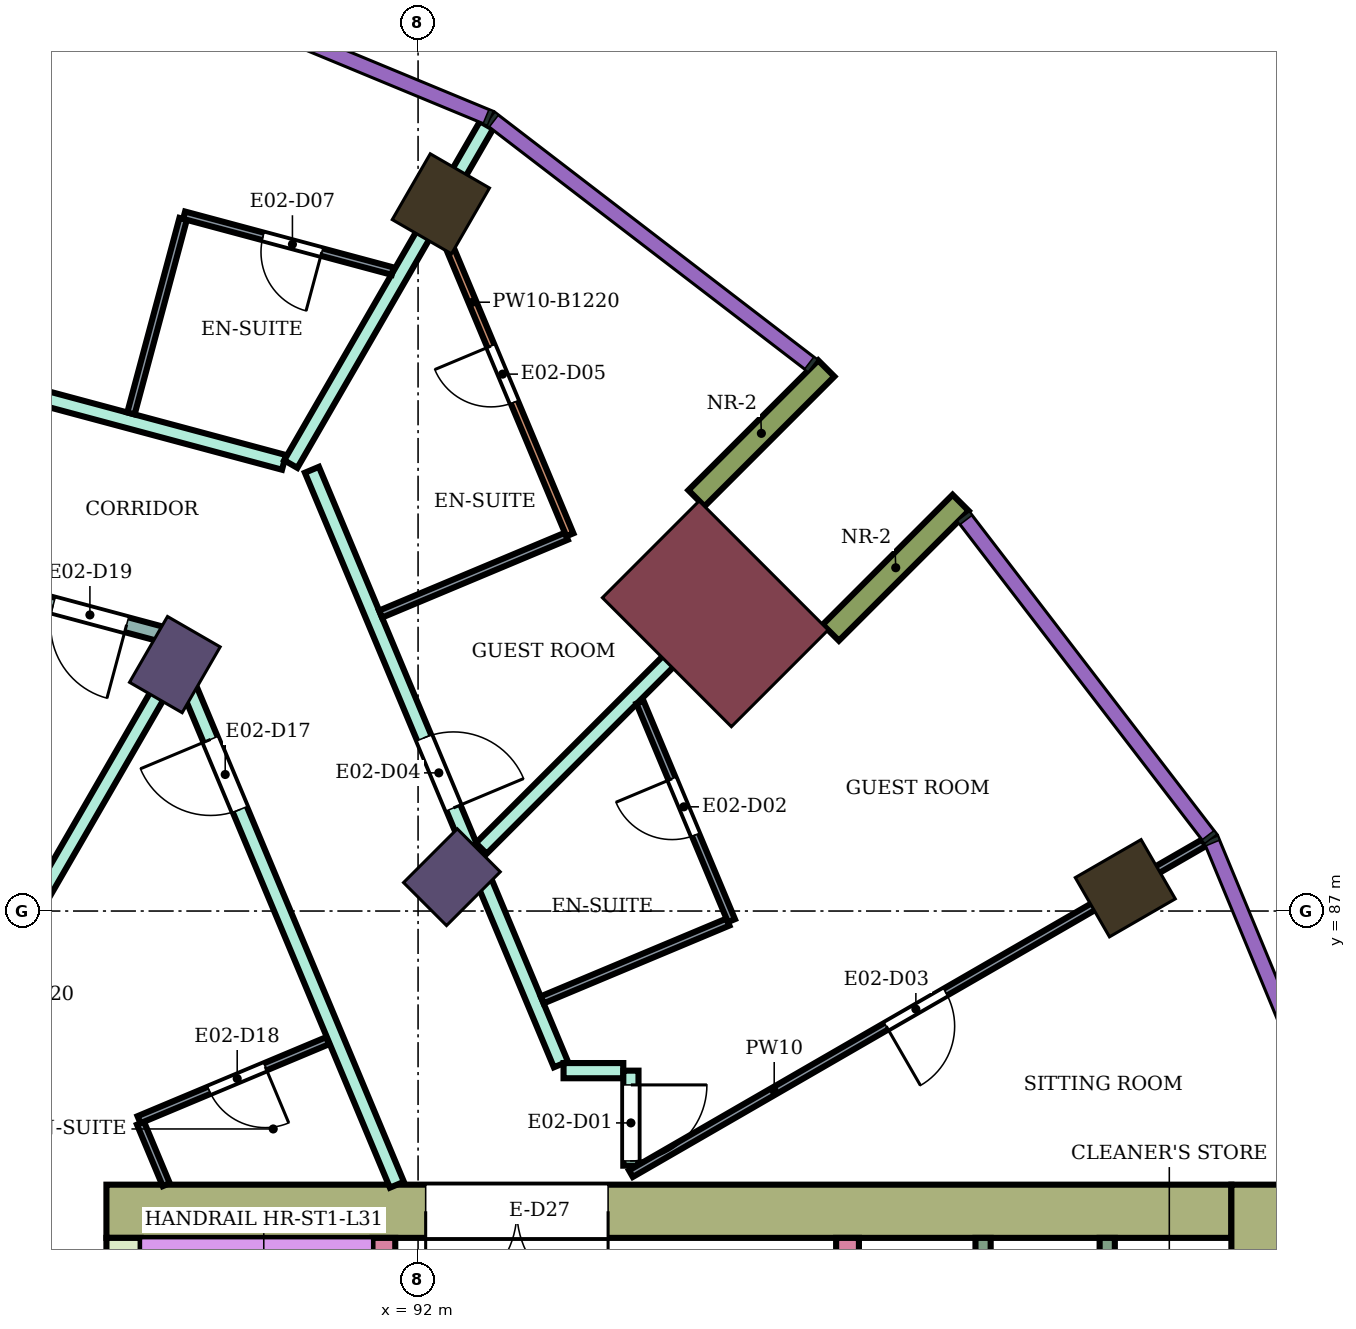
"""IFC4 building model, lengths in metres.
Left out: names, types, materials, properties, quantities, classifications, styles, units other than length and angle.
Written with IfcOpenShell. Run it as: python <this file> out.ifc"""

import sys

from ifc_helpers import new_model, si_unit, direction, frame, frame_2d, origin, origin_2d, place, context, subcontext, project, spatial, rectangle, extrude, element, fill, save


model = new_model("IFC4")
c1 = context("Model", 3, precision=1e-05, world=origin(), true_north=direction((0.0, 1.0)))
c2 = subcontext(c1, "Body", "Model", "MODEL_VIEW")
j1 = project(units=[si_unit("LENGTHUNIT", "METRE"), si_unit("PLANEANGLEUNIT", "RADIAN")], contexts=[c1])
p1 = place(None, origin())
s1 = spatial("IfcSite", under=j1, at=p1, CompositionType="ELEMENT")
p2 = place(p1, origin())
s2 = spatial("IfcBuilding", under=s1, at=p2, CompositionType="ELEMENT")
p3 = place(p2, frame((0.0, 0.0, 134.1)))
s3 = spatial("IfcBuildingStorey", under=s2, at=p3, CompositionType="ELEMENT", Elevation=134.1)
for number, where, z_axis, x_axis in (
    (1, (101.304, 87.3, 0.0), (0.0, 0.0, 1.0), (0.866, 0.5, 0.0)),
    (2, (92.3, 96.304, 0.0), (0.0, 0.0, 1.0), (0.5, 0.866, 0.0)),
):
    element("IfcColumn", number, at=place(p3, frame(where, z_axis=z_axis, x_axis=x_axis)), inside=s3, PredefinedType="COLUMN", context=c2, shape_type="SweptSolid", body=[
        extrude(rectangle(XDim=1.0, YDim=0.9, at=origin_2d()), origin(), (0.0, 0.0, 1.0), 3.9),
    ])
for number, where, z_axis, x_axis in (
    (3, (92.445, 87.445, 0.0), (0.0, 0.0, 1.0), (0.707, 0.707, 0.0)),
    (4, (88.8, 90.242, 0.0), (0.0, 0.0, 1.0), (0.5, 0.866, 0.0)),
):
    element("IfcColumn", number, at=place(p3, frame(where, z_axis=z_axis, x_axis=x_axis)), inside=s3, PredefinedType="COLUMN", context=c2, shape_type="SweptSolid", body=[
        extrude(rectangle(XDim=1.0, YDim=0.8, at=origin_2d()), origin(), (0.0, 0.0, 1.0), 3.9),
    ])
p4 = place(p3, frame((95.91, 90.91, 0.0), z_axis=(0.0, 0.0, 1.0), x_axis=(0.707106781187, 0.707106781187, 0.0)))
e5 = element("IfcColumn", 5, at=p4, inside=s3, PredefinedType="COLUMN", context=c2, shape_type="SweptSolid", body=[
    extrude(rectangle(XDim=1.8, YDim=2.4, at=origin_2d()), origin(), (0.0, 0.0, 1.0), 3.9),
])
p5 = place(p3, frame((87.9, 83.05, 0.0), z_axis=(0.0, 0.0, 1.0), x_axis=(1.0, 0.0, 0.0)))
e6 = element("IfcWall", 6, at=p5, inside=s3, PredefinedType="SHEAR", context=c2, shape_type="SweptSolid", body=[
    extrude(rectangle(XDim=14.8, YDim=0.7, at=frame_2d((7.4, 0.0))), origin(), (0.0, 0.0, 1.0), 3.58),
])
p6 = place(p5, frame((4.2, 0.0, 0.0)))
e7 = element("IfcOpeningElement", 7, at=p6, cuts=e6, PredefinedType="OPENING", context=c2, shape_type="SweptSolid", body=[
    extrude(rectangle(XDim=2.4, YDim=2.4, at=frame_2d((1.2, 1.2))), frame((0.0, 0.36, 0.0), z_axis=(0.0, -1.0, 0.0), x_axis=(1.0, 0.0, 0.0)), (0.0, 0.0, 1.0), 0.72),
])
p7 = place(p3, frame((88.125, 75.0, 0.0), z_axis=(0.0, 0.0, 1.0), x_axis=(0.0, 1.0, 0.0)))
e8 = element("IfcWall", 8, at=p7, inside=s3, PredefinedType="SHEAR", context=c2, shape_type="SweptSolid", body=[
    extrude(rectangle(XDim=7.7, YDim=0.45, at=frame_2d((3.85, 0.0))), origin(), (0.0, 0.0, 1.0), 3.58),
])
p8 = place(p3, frame((103.05, 66.6, 0.0), z_axis=(0.0, 0.0, 1.0), x_axis=(0.0, 1.0, 0.0)))
e9 = element("IfcWall", 9, at=p8, inside=s3, PredefinedType="SHEAR", context=c2, shape_type="SweptSolid", body=[
    extrude(rectangle(XDim=16.8, YDim=0.7, at=frame_2d((8.4, 0.0))), origin(), (0.0, 0.0, 1.0), 3.58),
])
p9 = place(p3, frame((91.55, 75.0, 0.0), z_axis=(0.0, 0.0, 1.0), x_axis=(0.0, 1.0, 0.0)))
e10 = element("IfcWall", 10, at=p9, inside=s3, PredefinedType="SHEAR", context=c2, shape_type="SweptSolid", body=[
    extrude(rectangle(XDim=7.7, YDim=0.3, at=frame_2d((3.85, 0.0))), origin(), (0.0, 0.0, 1.0), 3.58),
])
p10 = place(p9, frame((1.85, 0.0, 0.0)))
e11 = element("IfcOpeningElement", 11, at=p10, cuts=e10, PredefinedType="OPENING", context=c2, shape_type="SweptSolid", body=[
    extrude(rectangle(XDim=0.9, YDim=2.1, at=frame_2d((0.45, 1.05))), frame((0.0, 0.16, 0.0), z_axis=(0.0, -1.0, 0.0), x_axis=(1.0, 0.0, 0.0)), (0.0, 0.0, 1.0), 0.32),
])
p11 = place(p3, frame((97.65, 79.55, 0.0), z_axis=(0.0, 0.0, 1.0), x_axis=(0.0, 1.0, 0.0)))
e12 = element("IfcWall", 12, at=p11, inside=s3, PredefinedType="SHEAR", context=c2, shape_type="SweptSolid", body=[
    extrude(rectangle(XDim=3.15, YDim=0.3, at=frame_2d((1.575, 0.0))), origin(), (0.0, 0.0, 1.0), 3.58),
])
for number, where, z_axis, x_axis in (
    (13, (97.43, 90.662, 0.0), (0.0, 0.0, 1.0), (0.707, 0.707, 0.0)),
    (14, (95.662, 92.43, 0.0), (0.0, 0.0, 1.0), (0.707, 0.707, 0.0)),
):
    element("IfcWall", number, at=place(p3, frame(where, z_axis=z_axis, x_axis=x_axis)), inside=s3, PredefinedType="NOTDEFINED", context=c2, shape_type="SweptSolid", body=[
        extrude(rectangle(XDim=2.416, YDim=0.3, at=frame_2d((1.208, 0.0))), origin(), (0.0, 0.0, 1.0), 3.9),
    ])
p12 = place(p3, frame((80.0, 92.954, 0.0), z_axis=(0.0, 0.0, 1.0), x_axis=(0.96592536278, -0.258820774936, 0.0)))
e15 = element("IfcWall", 15, at=p12, inside=s3, PredefinedType="PARTITIONING", context=c2, shape_type="SweptSolid", body=[
    extrude(rectangle(XDim=8.934, YDim=0.2, at=frame_2d((4.467, 0.0))), origin(), (0.0, 0.0, 1.0), 3.08),
])
p13 = place(p12, frame((7.454, 0.0, 0.0)))
e16 = element("IfcOpeningElement", 16, at=p13, cuts=e15, PredefinedType="OPENING", context=c2, shape_type="SweptSolid", body=[
    extrude(rectangle(XDim=1.0, YDim=2.1, at=frame_2d((0.5, 1.05))), frame((0.0, 0.11, 0.0), z_axis=(0.0, -1.0, 0.0), x_axis=(1.0, 0.0, 0.0)), (0.0, 0.0, 1.0), 0.22),
])
p14 = place(p3, frame((80.0, 95.648, 0.0), z_axis=(0.0, 0.0, 1.0), x_axis=(0.965852259202, -0.259093445292, 0.0)))
e17 = element("IfcWall", 17, at=p14, inside=s3, PredefinedType="PARTITIONING", context=c2, shape_type="SweptSolid", body=[
    extrude(rectangle(XDim=10.597, YDim=0.2, at=frame_2d((5.298, 0.0))), origin(), (0.0, 0.0, 1.0), 3.45),
])
p15 = place(p14, frame((1.0, 0.0, 0.0)))
e18 = element("IfcOpeningElement", 18, at=p15, cuts=e17, PredefinedType="OPENING", context=c2, shape_type="SweptSolid", body=[
    extrude(rectangle(XDim=1.0, YDim=2.1, at=frame_2d((0.5, 1.05))), frame((0.0, 0.11, 0.0), z_axis=(0.0, -1.0, 0.0), x_axis=(1.0, 0.0, 0.0)), (0.0, 0.0, 1.0), 0.22),
])
p16 = place(p3, frame((83.85, 81.667, 0.0), z_axis=(0.0, 0.0, 1.0), x_axis=(0.500092047414, 0.865972253663, 0.0)))
e19 = element("IfcWall", 19, at=p16, inside=s3, PredefinedType="PARTITIONING", context=c2, shape_type="SweptSolid", body=[
    extrude(rectangle(XDim=9.778, YDim=0.2, at=frame_2d((4.889, 0.0))), origin(), (0.0, 0.0, 1.0), 3.45),
])
p17 = place(p3, frame((88.698, 90.624, 0.0), z_axis=(0.0, 0.0, 1.0), x_axis=(0.386027055918, -0.922487459047, 0.0)))
e20 = element("IfcWall", 20, at=p17, inside=s3, PredefinedType="PARTITIONING", context=c2, shape_type="SweptSolid", body=[
    extrude(rectangle(XDim=7.832, YDim=0.2, at=frame_2d((3.916, 0.0))), origin(), (0.0, 0.0, 1.0), 3.45),
])
p18 = place(p17, frame((1.482, 0.0, 0.0)))
e21 = element("IfcOpeningElement", 21, at=p18, cuts=e20, PredefinedType="OPENING", context=c2, shape_type="SweptSolid", body=[
    extrude(rectangle(XDim=1.0, YDim=2.1, at=frame_2d((0.5, 1.05))), frame((0.0, 0.11, 0.0), z_axis=(0.0, -1.0, 0.0), x_axis=(1.0, 0.0, 0.0)), (0.0, 0.0, 1.0), 0.22),
])
p19 = place(p3, frame((90.325, 92.88, 0.0), z_axis=(0.0, 0.0, 1.0), x_axis=(0.500084891114, 0.865976386329, 0.0)))
e22 = element("IfcWall", 22, at=p19, inside=s3, PredefinedType="PARTITIONING", context=c2, shape_type="SweptSolid", body=[
    extrude(rectangle(XDim=5.15, YDim=0.2, at=frame_2d((2.575, 0.0))), origin(), (0.0, 0.0, 1.0), 3.45),
])
p20 = place(p3, frame((90.604, 92.805, 0.0), z_axis=(0.0, 0.0, 1.0), x_axis=(0.386199042801, -0.922415470024, 0.0)))
e23 = element("IfcWall", 23, at=p20, inside=s3, PredefinedType="PARTITIONING", context=c2, shape_type="SweptSolid", body=[
    extrude(rectangle(XDim=8.48, YDim=0.2, at=frame_2d((4.24, 0.0))), origin(), (0.0, 0.0, 1.0), 3.45),
])
p21 = place(p20, frame((3.823, 0.0, 0.0)))
e24 = element("IfcOpeningElement", 24, at=p21, cuts=e23, PredefinedType="OPENING", context=c2, shape_type="SweptSolid", body=[
    extrude(rectangle(XDim=1.0, YDim=2.1, at=frame_2d((0.5, 1.05))), frame((0.0, 0.11, 0.0), z_axis=(0.0, -1.0, 0.0), x_axis=(1.0, 0.0, 0.0)), (0.0, 0.0, 1.0), 0.22),
])
p22 = place(p3, frame((92.832, 87.825, 0.0), z_axis=(0.0, 0.0, 1.0), x_axis=(0.707275688599, 0.706937833418, 0.0)))
e25 = element("IfcWall", 25, at=p22, inside=s3, PredefinedType="PARTITIONING", context=c2, shape_type="SweptSolid", body=[
    extrude(rectangle(XDim=5.058, YDim=0.2, at=frame_2d((2.529, 0.0))), origin(), (0.0, 0.0, 1.0), 3.45),
])
p23 = place(p3, frame((93.914, 84.9, 0.0), z_axis=(0.0, 0.0, 1.0), x_axis=(1.0, 0.0, 0.0)))
e26 = element("IfcWall", 26, at=p23, inside=s3, PredefinedType="PARTITIONING", context=c2, shape_type="SweptSolid", body=[
    extrude(rectangle(XDim=0.786, YDim=0.2, at=frame_2d((0.393, 0.0))), origin(), (0.0, 0.0, 1.0), 3.45),
])
p24 = place(p3, frame((94.8, 83.65, 0.0), z_axis=(0.0, 0.0, 1.0), x_axis=(0.0, 1.0, 0.0)))
e27 = element("IfcWall", 27, at=p24, inside=s3, PredefinedType="PARTITIONING", context=c2, shape_type="SweptSolid", body=[
    extrude(rectangle(XDim=1.25, YDim=0.2, at=frame_2d((0.625, 0.0))), origin(), (0.0, 0.0, 1.0), 3.45),
])
p25 = place(p24, frame((0.062, 0.0, 0.0)))
e28 = element("IfcOpeningElement", 28, at=p25, cuts=e27, PredefinedType="OPENING", context=c2, shape_type="SweptSolid", body=[
    extrude(rectangle(XDim=1.0, YDim=2.1, at=frame_2d((0.5, 1.05))), frame((0.0, 0.11, 0.0), z_axis=(0.0, -1.0, 0.0), x_axis=(1.0, 0.0, 0.0)), (0.0, 0.0, 1.0), 0.22),
])
p26 = place(p3, frame((88.223, 93.547, 0.0), z_axis=(0.0, 0.0, 1.0), x_axis=(0.259021640683, 0.965871518194, 0.0)))
e29 = element("IfcWall", 29, at=p26, inside=s3, PredefinedType="PARTITIONING", context=c2, shape_type="SweptSolid", body=[
    extrude(rectangle(XDim=2.649, YDim=0.1, at=frame_2d((1.325, 0.0))), origin(), (0.0, 0.0, 1.0), 3.45),
])
p27 = place(p3, frame((88.348, 84.209, 0.0), z_axis=(0.0, 0.0, 1.0), x_axis=(0.386077497504, -0.922466349479, 0.0)))
e30 = element("IfcWall", 30, at=p27, inside=s3, PredefinedType="PARTITIONING", context=c2, shape_type="SweptSolid", body=[
    extrude(rectangle(XDim=0.877, YDim=0.1, at=frame_2d((0.438, 0.0))), origin(), (0.0, 0.0, 1.0), 3.45),
])
p28 = place(p3, frame((88.329, 84.255, 0.0), z_axis=(0.0, 0.0, 1.0), x_axis=(0.922320663728, 0.386425404522, 0.0)))
e31 = element("IfcWall", 31, at=p28, inside=s3, PredefinedType="PARTITIONING", context=c2, shape_type="SweptSolid", body=[
    extrude(rectangle(XDim=2.69, YDim=0.1, at=frame_2d((1.345, 0.0))), origin(), (0.0, 0.0, 1.0), 3.45),
])
p29 = place(p28, frame((1.0, 0.0, 0.0)))
e32 = element("IfcOpeningElement", 32, at=p29, cuts=e31, PredefinedType="OPENING", context=c2, shape_type="SweptSolid", body=[
    extrude(rectangle(XDim=0.8, YDim=2.1, at=frame_2d((0.4, 1.05))), frame((0.0, 0.06, 0.0), z_axis=(0.0, -1.0, 0.0), x_axis=(1.0, 0.0, 0.0)), (0.0, 0.0, 1.0), 0.12),
])
p30 = place(p3, frame((88.922, 96.154, 0.0), z_axis=(0.0, 0.0, 1.0), x_axis=(0.965887418767, -0.258962341408, 0.0)))
e33 = element("IfcWall", 33, at=p30, inside=s3, PredefinedType="PARTITIONING", context=c2, shape_type="SweptSolid", body=[
    extrude(rectangle(XDim=2.841, YDim=0.1, at=frame_2d((1.42, 0.0))), origin(), (0.0, 0.0, 1.0), 3.45),
])
p31 = place(p30, frame((1.075, 0.0, 0.0)))
e34 = element("IfcOpeningElement", 34, at=p31, cuts=e33, PredefinedType="OPENING", context=c2, shape_type="SweptSolid", body=[
    extrude(rectangle(XDim=0.8, YDim=2.1, at=frame_2d((0.4, 1.05))), frame((0.0, 0.06, 0.0), z_axis=(0.0, -1.0, 0.0), x_axis=(1.0, 0.0, 0.0)), (0.0, 0.0, 1.0), 0.12),
])
p32 = place(p3, frame((91.507, 90.907, 0.0), z_axis=(0.0, 0.0, 1.0), x_axis=(0.922344808264, 0.38636777126, 0.0)))
e35 = element("IfcWall", 35, at=p32, inside=s3, PredefinedType="PARTITIONING", context=c2, shape_type="SweptSolid", body=[
    extrude(rectangle(XDim=2.65, YDim=0.1, at=frame_2d((1.325, 0.0))), origin(), (0.0, 0.0, 1.0), 3.45),
])
p33 = place(p3, frame((92.289, 96.03, 0.0), z_axis=(0.0, 0.0, 1.0), x_axis=(0.386237487323, -0.922399373041, 0.0)))
e36 = element("IfcWall", 36, at=p33, inside=s3, PredefinedType="PARTITIONING", context=c2, shape_type="SweptSolid", body=[
    extrude(rectangle(XDim=4.423, YDim=0.1, at=frame_2d((2.211, 0.0))), origin(), (0.0, 0.0, 1.0), 2.68),
])
p34 = place(p33, frame((1.731, 0.0, 0.0)))
e37 = element("IfcOpeningElement", 37, at=p34, cuts=e36, PredefinedType="OPENING", context=c2, shape_type="SweptSolid", body=[
    extrude(rectangle(XDim=0.8, YDim=2.1, at=frame_2d((0.4, 1.05))), frame((0.0, 0.06, 0.0), z_axis=(0.0, -1.0, 0.0), x_axis=(1.0, 0.0, 0.0)), (0.0, 0.0, 1.0), 0.12),
])
p35 = place(p3, frame((93.633, 85.831, 0.0), z_axis=(0.0, 0.0, 1.0), x_axis=(0.922344808264, 0.38636777126, 0.0)))
e38 = element("IfcWall", 38, at=p35, inside=s3, PredefinedType="PARTITIONING", context=c2, shape_type="SweptSolid", body=[
    extrude(rectangle(XDim=2.65, YDim=0.1, at=frame_2d((1.325, 0.0))), origin(), (0.0, 0.0, 1.0), 3.45),
])
p36 = place(p3, frame((94.8, 83.545, 0.0), z_axis=(0.0, 0.0, 1.0), x_axis=(0.86602264145, 0.500004784474, 0.0)))
e39 = element("IfcWall", 39, at=p36, inside=s3, PredefinedType="PARTITIONING", context=c2, shape_type="SweptSolid", body=[
    extrude(rectangle(XDim=8.708, YDim=0.1, at=frame_2d((4.354, 0.0))), origin(), (0.0, 0.0, 1.0), 3.45),
])
p37 = place(p36, frame((3.879, 0.0, 0.0)))
e40 = element("IfcOpeningElement", 40, at=p37, cuts=e39, PredefinedType="OPENING", context=c2, shape_type="SweptSolid", body=[
    extrude(rectangle(XDim=0.9, YDim=2.1, at=frame_2d((0.45, 1.05))), frame((0.0, 0.06, 0.0), z_axis=(0.0, -1.0, 0.0), x_axis=(1.0, 0.0, 0.0)), (0.0, 0.0, 1.0), 0.12),
])
p38 = place(p3, frame((94.919, 89.748, 0.0), z_axis=(0.0, 0.0, 1.0), x_axis=(0.386255913529, -0.922391657196, 0.0)))
e41 = element("IfcWall", 41, at=p38, inside=s3, PredefinedType="PARTITIONING", context=c2, shape_type="SweptSolid", body=[
    extrude(rectangle(XDim=3.116, YDim=0.1, at=frame_2d((1.558, 0.0))), origin(), (0.0, 0.0, 1.0), 3.45),
])
p39 = place(p38, frame((1.093, 0.0, 0.0)))
e42 = element("IfcOpeningElement", 42, at=p39, cuts=e41, PredefinedType="OPENING", context=c2, shape_type="SweptSolid", body=[
    extrude(rectangle(XDim=0.8, YDim=2.1, at=frame_2d((0.4, 1.05))), frame((0.0, 0.06, 0.0), z_axis=(0.0, -1.0, 0.0), x_axis=(1.0, 0.0, 0.0)), (0.0, 0.0, 1.0), 0.12),
])
for number, where, z_axis, x_axis in (
    (43, (99.433, 79.85, 0.0), (0.0, 0.0, 1.0), (0.0, 1.0, 0.0)),
    (44, (101.067, 79.85, 0.0), (0.0, 0.0, 1.0), (0.0, 1.0, 0.0)),
):
    element("IfcWall", number, at=place(p3, frame(where, z_axis=z_axis, x_axis=x_axis)), inside=s3, PredefinedType="PARTITIONING", context=c2, shape_type="SweptSolid", body=[
        extrude(rectangle(XDim=2.85, YDim=0.2, at=frame_2d((1.425, 0.0))), origin(), (0.0, 0.0, 1.0), 3.58),
    ])
p40 = place(p25, frame((1.0, 0.0, 0.0), z_axis=(0.0, 0.0, 1.0), x_axis=(-1.0, 0.0, 0.0)))
e45 = element("IfcDoor", 45, at=p40, inside=s3, OperationType="SINGLE_SWING_LEFT", PredefinedType="DOOR", context=c2, shape_type="SweptSolid", body=[
    extrude(rectangle(XDim=1.0, YDim=2.1, at=frame_2d((0.5, 1.05))), frame((0.0, 0.025, 0.0), z_axis=(0.0, -1.0, 0.0), x_axis=(1.0, 0.0, 0.0)), (0.0, 0.0, 1.0), 0.05),
])
fill(e28, e45)
p41 = place(p39, frame((0.8, 0.0, 0.0), z_axis=(0.0, 0.0, 1.0), x_axis=(-1.0, 0.0, 0.0)))
e46 = element("IfcDoor", 46, at=p41, inside=s3, OperationType="SINGLE_SWING_RIGHT", PredefinedType="DOOR", context=c2, shape_type="SweptSolid", body=[
    extrude(rectangle(XDim=0.8, YDim=2.1, at=frame_2d((0.4, 1.05))), frame((0.0, 0.025, 0.0), z_axis=(0.0, -1.0, 0.0), x_axis=(1.0, 0.0, 0.0)), (0.0, 0.0, 1.0), 0.05),
])
fill(e42, e46)
p42 = place(p37, frame((0.9, 0.0, 0.0), z_axis=(0.0, 0.0, 1.0), x_axis=(-1.0, 0.0, 0.0)))
e47 = element("IfcDoor", 47, at=p42, inside=s3, OperationType="SINGLE_SWING_RIGHT", PredefinedType="DOOR", context=c2, shape_type="SweptSolid", body=[
    extrude(rectangle(XDim=0.9, YDim=2.1, at=frame_2d((0.45, 1.05))), frame((0.0, 0.025, 0.0), z_axis=(0.0, -1.0, 0.0), x_axis=(1.0, 0.0, 0.0)), (0.0, 0.0, 1.0), 0.05),
])
fill(e40, e47)
p43 = place(p21, origin())
e48 = element("IfcDoor", 48, at=p43, inside=s3, OperationType="SINGLE_SWING_RIGHT", PredefinedType="DOOR", context=c2, shape_type="SweptSolid", body=[
    extrude(rectangle(XDim=1.0, YDim=2.1, at=frame_2d((0.5, 1.05))), frame((0.0, 0.025, 0.0), z_axis=(0.0, -1.0, 0.0), x_axis=(1.0, 0.0, 0.0)), (0.0, 0.0, 1.0), 0.05),
])
fill(e24, e48)
p44 = place(p34, frame((0.8, 0.0, 0.0), z_axis=(0.0, 0.0, 1.0), x_axis=(-1.0, 0.0, 0.0)))
e49 = element("IfcDoor", 49, at=p44, inside=s3, OperationType="SINGLE_SWING_RIGHT", PredefinedType="DOOR", context=c2, shape_type="SweptSolid", body=[
    extrude(rectangle(XDim=0.8, YDim=2.1, at=frame_2d((0.4, 1.05))), frame((0.0, 0.025, 0.0), z_axis=(0.0, -1.0, 0.0), x_axis=(1.0, 0.0, 0.0)), (0.0, 0.0, 1.0), 0.05),
])
fill(e37, e49)
p45 = place(p31, frame((0.8, 0.0, 0.0), z_axis=(0.0, 0.0, 1.0), x_axis=(-1.0, 0.0, 0.0)))
e50 = element("IfcDoor", 50, at=p45, inside=s3, OperationType="SINGLE_SWING_LEFT", PredefinedType="DOOR", context=c2, shape_type="SweptSolid", body=[
    extrude(rectangle(XDim=0.8, YDim=2.1, at=frame_2d((0.4, 1.05))), frame((0.0, 0.025, 0.0), z_axis=(0.0, -1.0, 0.0), x_axis=(1.0, 0.0, 0.0)), (0.0, 0.0, 1.0), 0.05),
])
fill(e34, e50)
p46 = place(p18, frame((1.0, 0.0, 0.0), z_axis=(0.0, 0.0, 1.0), x_axis=(-1.0, 0.0, 0.0)))
e51 = element("IfcDoor", 51, at=p46, inside=s3, OperationType="SINGLE_SWING_RIGHT", PredefinedType="DOOR", context=c2, shape_type="SweptSolid", body=[
    extrude(rectangle(XDim=1.0, YDim=2.1, at=frame_2d((0.5, 1.05))), frame((0.0, 0.025, 0.0), z_axis=(0.0, -1.0, 0.0), x_axis=(1.0, 0.0, 0.0)), (0.0, 0.0, 1.0), 0.05),
])
fill(e21, e51)
p47 = place(p29, frame((0.8, 0.0, 0.0), z_axis=(0.0, 0.0, 1.0), x_axis=(-1.0, 0.0, 0.0)))
e52 = element("IfcDoor", 52, at=p47, inside=s3, OperationType="SINGLE_SWING_LEFT", PredefinedType="DOOR", context=c2, shape_type="SweptSolid", body=[
    extrude(rectangle(XDim=0.8, YDim=2.1, at=frame_2d((0.4, 1.05))), frame((0.0, 0.025, 0.0), z_axis=(0.0, -1.0, 0.0), x_axis=(1.0, 0.0, 0.0)), (0.0, 0.0, 1.0), 0.05),
])
fill(e32, e52)
p48 = place(p13, frame((1.0, 0.0, 0.0), z_axis=(0.0, 0.0, 1.0), x_axis=(-1.0, 0.0, 0.0)))
e53 = element("IfcDoor", 53, at=p48, inside=s3, OperationType="SINGLE_SWING_LEFT", PredefinedType="DOOR", context=c2, shape_type="SweptSolid", body=[
    extrude(rectangle(XDim=1.0, YDim=2.1, at=frame_2d((0.5, 1.05))), frame((0.0, 0.025, 0.0), z_axis=(0.0, -1.0, 0.0), x_axis=(1.0, 0.0, 0.0)), (0.0, 0.0, 1.0), 0.05),
])
fill(e16, e53)
p49 = place(p6, frame((2.4, 0.0, 0.0), z_axis=(0.0, 0.0, 1.0), x_axis=(-1.0, 0.0, 0.0)))
e54 = element("IfcDoor", 54, at=p49, inside=s3, OperationType="DOUBLE_DOOR_SINGLE_SWING", PredefinedType="DOOR", context=c2, shape_type="SweptSolid", body=[
    extrude(rectangle(XDim=2.4, YDim=2.4, at=frame_2d((1.2, 1.2))), frame((0.0, 0.025, 0.0), z_axis=(0.0, -1.0, 0.0), x_axis=(1.0, 0.0, 0.0)), (0.0, 0.0, 1.0), 0.05),
])
fill(e7, e54)
save(model, sys.argv[1])
